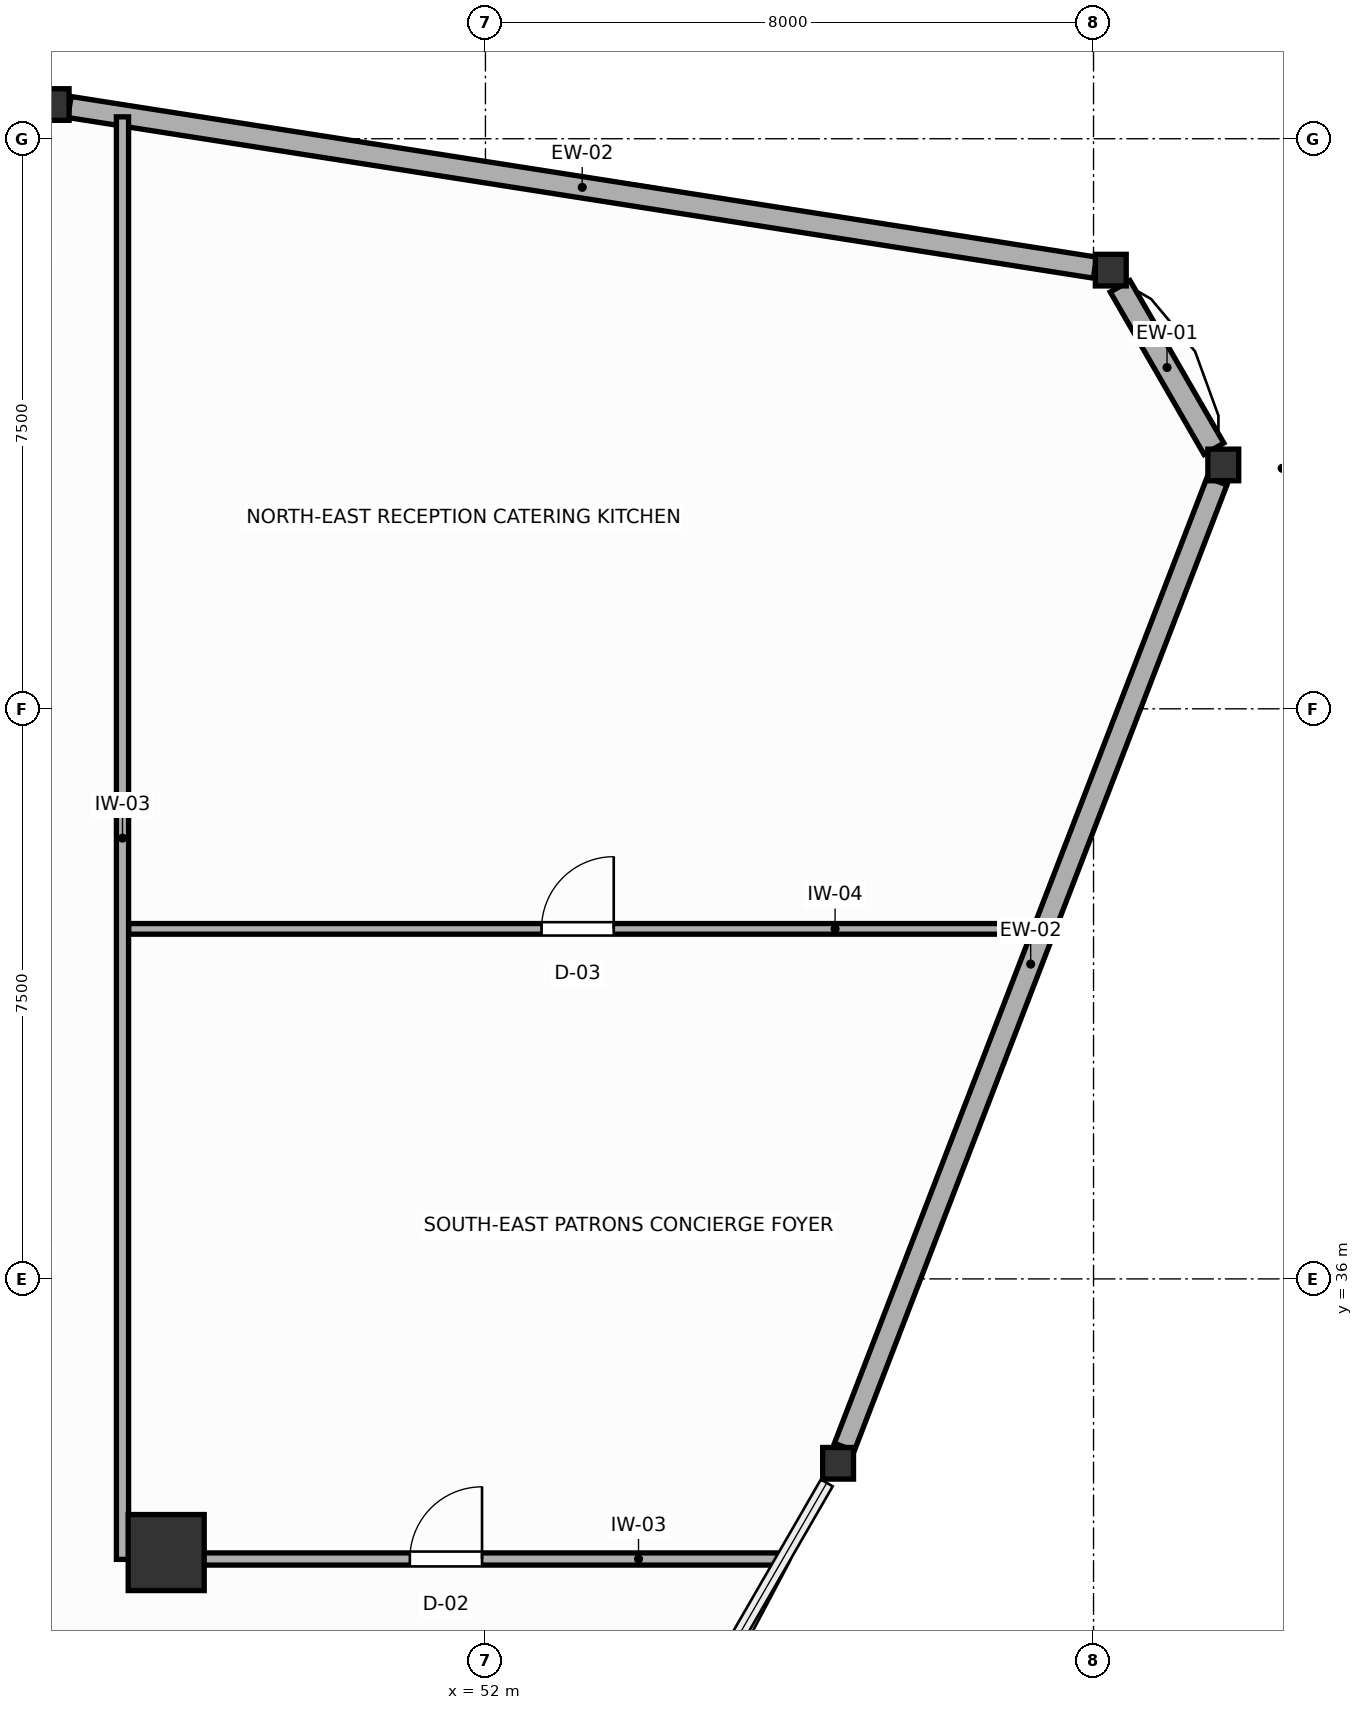
"""IFC4 building model, lengths in metres.
Left out: names, types, materials, properties, quantities, classifications, styles, units other than length and angle.
Written with IfcOpenShell. Run it as: python <this file> out.ifc"""

import sys

from ifc_helpers import new_model, si_unit, direction, frame, frame_2d, origin, origin_2d, place, context, subcontext, project, spatial, rectangle, i_section, extrude, source, transform, mapped, element, fill, save


model = new_model("IFC4")
c1 = context("Model", 3, precision=1e-05, world=origin(), true_north=direction((0.0, 1.0)))
c2 = subcontext(c1, "Body", "Model", "MODEL_VIEW")
j1 = project(units=[si_unit("LENGTHUNIT", "METRE"), si_unit("PLANEANGLEUNIT", "RADIAN")], contexts=[c1])
p1 = place(None, origin())
s1 = spatial("IfcSite", under=j1, at=p1, CompositionType="ELEMENT")
p2 = place(p1, origin())
s2 = spatial("IfcBuilding", under=s1, at=p2, CompositionType="ELEMENT")
p3 = place(p2, frame((0.0, 0.0, 223.8)))
s3 = spatial("IfcBuildingStorey", under=s2, at=p3, CompositionType="ELEMENT", Elevation=223.8)
m1 = source(origin(), c2, "Body", "SweptSolid", [
    extrude(rectangle(XDim=1.0, YDim=1.0, at=origin_2d()), origin(), (0.0, 0.0, 1.0), 3.6),
])
p4 = place(p3, frame((47.8, 32.4, 0.0), z_axis=(0.0, 0.0, 1.0), x_axis=(1.0, 0.0, 0.0)))
e1 = element("IfcColumn", 1, at=p4, inside=s3, PredefinedType="COLUMN", context=c2, shape_type="MappedRepresentation", body=[
    mapped(m1, transform((0.0, 0.0, 0.0), scale=1.0)),
])
m2 = source(origin(), c2, "Body", "SweptSolid", [
    extrude(i_section(OverallWidth=0.406, OverallDepth=0.416, WebThickness=0.027, FlangeThickness=0.044, FilletRadius=0.015, at=origin_2d()), origin(), (0.0, 0.0, 1.0), 3.6),
])
for number, where, z_axis, x_axis in (
    (2, (61.707, 46.708, 0.0), (0.0, 0.0, 1.0), (1.0, 0.0, 0.0)),
    (3, (60.227, 49.271, 0.0), (0.0, 0.0, 1.0), (1.0, 0.0, 0.0)),
    (4, (46.319, 51.45, 0.0), (0.0, 0.0, 1.0), (1.0, 0.0, 0.0)),
    (5, (56.639, 33.574, 0.0), (0.0, 0.0, 1.0), (1.0, 0.0, 0.0)),
):
    element("IfcColumn", number, at=place(p3, frame(where, z_axis=z_axis, x_axis=x_axis)), inside=s3, PredefinedType="COLUMN", context=c2, shape_type="MappedRepresentation", body=[
        mapped(m2, transform((0.0, 0.0, 0.0), scale=1.0)),
    ])
p5 = place(p3, frame((61.584, 46.921, 0.0), z_axis=(0.0, 0.0, 1.0), x_axis=(-0.499990780478, 0.866030726613, 0.0)))
e6 = element("IfcWall", 6, at=p5, inside=s3, PredefinedType="SOLIDWALL", context=c2, shape_type="SweptSolid", body=[
    extrude(rectangle(XDim=2.468, YDim=0.3, at=frame_2d((1.234, 0.0))), origin(), (0.0, 0.0, 1.0), 1.88),
])
p6 = place(p3, frame((60.019, 49.304, 0.0), z_axis=(0.0, 0.0, 1.0), x_axis=(-0.987957437721, 0.154725890697, 0.0)))
e7 = element("IfcWall", 7, at=p6, inside=s3, PredefinedType="SOLIDWALL", context=c2, shape_type="SweptSolid", body=[
    extrude(rectangle(XDim=13.657, YDim=0.28, at=frame_2d((6.828, 0.0))), origin(), (0.0, 0.0, 1.0), 1.88),
])
p7 = place(p3, frame((56.722, 33.787, 0.0), z_axis=(0.0, 0.0, 1.0), x_axis=(0.359972142588, 0.932963052088, 0.0)))
e8 = element("IfcWall", 8, at=p7, inside=s3, PredefinedType="SOLIDWALL", context=c2, shape_type="SweptSolid", body=[
    extrude(rectangle(XDim=13.621, YDim=0.28, at=frame_2d((6.811, 0.0))), origin(), (0.0, 0.0, 1.0), 1.88),
])
p8 = place(p3, frame((47.225, 32.31, 0.0), z_axis=(0.0, 0.0, 1.0), x_axis=(0.0, 1.0, 0.0)))
e9 = element("IfcWall", 9, at=p8, inside=s3, PredefinedType="PARTITIONING", context=c2, shape_type="SweptSolid", body=[
    extrude(rectangle(XDim=18.978, YDim=0.16, at=frame_2d((9.489, 0.0))), origin(), (0.0, 0.0, 1.0), 3.41),
])
p9 = place(p3, frame((47.307, 32.315, 0.0), z_axis=(0.0, 0.0, 1.0), x_axis=(1.0, 0.0, 0.0)))
e10 = element("IfcWall", 10, at=p9, inside=s3, PredefinedType="PARTITIONING", context=c2, shape_type="SweptSolid", body=[
    extrude(rectangle(XDim=8.586, YDim=0.16, at=frame_2d((4.293, 0.0))), origin(), (0.0, 0.0, 1.0), 2.17),
])
p10 = place(p9, frame((3.698, 0.0, 0.0)))
e11 = element("IfcOpeningElement", 11, at=p10, cuts=e10, PredefinedType="OPENING", context=c2, shape_type="SweptSolid", body=[
    extrude(rectangle(XDim=0.95, YDim=2.05, at=frame_2d((0.475, 1.025))), frame((0.0, 0.09, 0.0), z_axis=(0.0, -1.0, 0.0), x_axis=(1.0, 0.0, 0.0)), (0.0, 0.0, 1.0), 0.18),
])
p11 = place(p3, frame((47.307, 40.605, 0.0), z_axis=(0.0, 0.0, 1.0), x_axis=(1.0, 0.0, 0.0)))
e12 = element("IfcWall", 12, at=p11, inside=s3, PredefinedType="PARTITIONING", context=c2, shape_type="SweptSolid", body=[
    extrude(rectangle(XDim=12.025, YDim=0.14, at=frame_2d((6.013, 0.0))), origin(), (0.0, 0.0, 1.0), 3.41),
])
p12 = place(p11, frame((5.431, 0.0, 0.0)))
e13 = element("IfcOpeningElement", 13, at=p12, cuts=e12, PredefinedType="OPENING", context=c2, shape_type="SweptSolid", body=[
    extrude(rectangle(XDim=0.95, YDim=2.05, at=frame_2d((0.475, 1.025))), frame((0.0, 0.08, 0.0), z_axis=(0.0, -1.0, 0.0), x_axis=(1.0, 0.0, 0.0)), (0.0, 0.0, 1.0), 0.16),
])
p13 = place(p10, origin())
e14 = element("IfcDoor", 14, at=p13, inside=s3, OperationType="SINGLE_SWING_RIGHT", PredefinedType="DOOR", context=c2, shape_type="SweptSolid", body=[
    extrude(rectangle(XDim=0.95, YDim=2.05, at=frame_2d((0.475, 1.025))), frame((0.0, 0.025, 0.0), z_axis=(0.0, -1.0, 0.0), x_axis=(1.0, 0.0, 0.0)), (0.0, 0.0, 1.0), 0.05),
])
fill(e11, e14)
p14 = place(p12, origin())
e15 = element("IfcDoor", 15, at=p14, inside=s3, OperationType="SINGLE_SWING_RIGHT", PredefinedType="DOOR", context=c2, shape_type="SweptSolid", body=[
    extrude(rectangle(XDim=0.95, YDim=2.05, at=frame_2d((0.475, 1.025))), frame((0.0, 0.025, 0.0), z_axis=(0.0, -1.0, 0.0), x_axis=(1.0, 0.0, 0.0)), (0.0, 0.0, 1.0), 0.05),
])
fill(e13, e15)
save(model, sys.argv[1])
